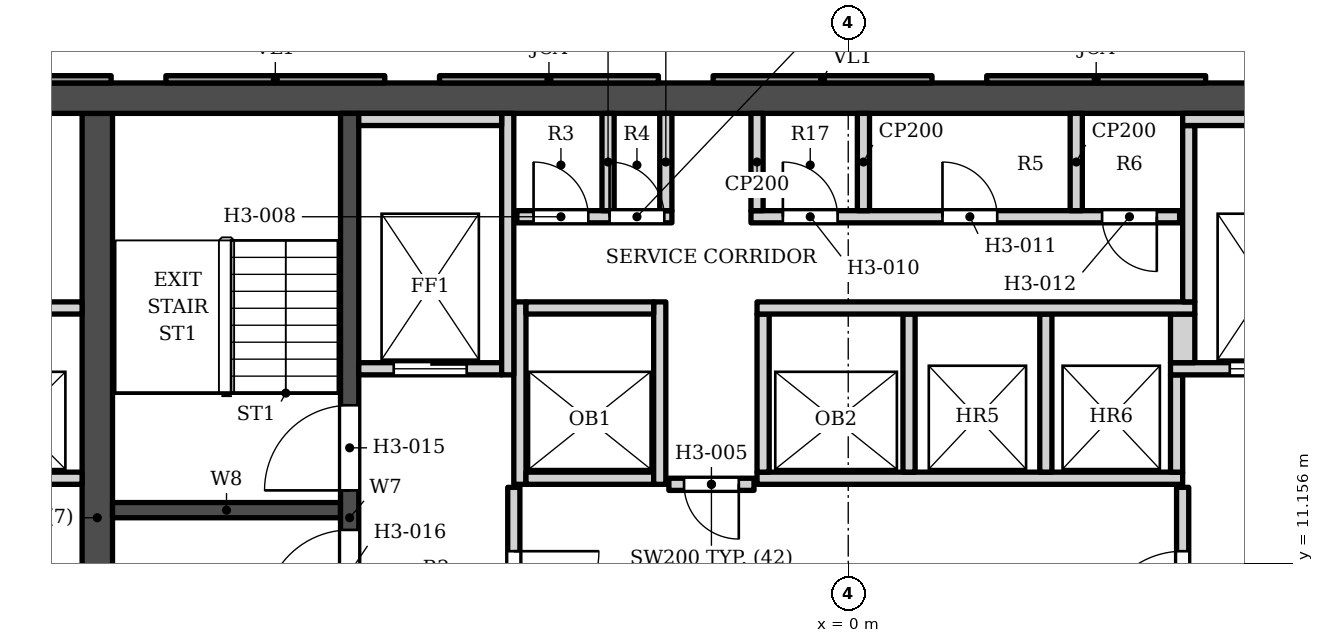
"""IFC4 building model, lengths in metres.
Left out: names, types, materials, properties, quantities, classifications, styles, units other than length and angle.
Written with IfcOpenShell. Run it as: python <this file> out.ifc"""

import sys

from ifc_helpers import new_model, si_unit, direction, frame, frame_2d, origin, place, context, subcontext, project, spatial, polyline, rectangle, outline, extrude, element, fill, save


model = new_model("IFC4")
c1 = context("Model", 3, precision=1e-05, world=origin(), true_north=direction((0.0, 1.0)))
c2 = subcontext(c1, "Body", "Model", "MODEL_VIEW")
j1 = project(units=[si_unit("LENGTHUNIT", "METRE"), si_unit("PLANEANGLEUNIT", "RADIAN")], contexts=[c1])
p1 = place(None, origin())
s1 = spatial("IfcSite", under=j1, at=p1, CompositionType="ELEMENT")
p2 = place(p1, origin())
s2 = spatial("IfcBuilding", under=s1, at=p2, CompositionType="ELEMENT")
p3 = place(p2, frame((0.0, 0.0, 66.4)))
s3 = spatial("IfcBuildingStorey", under=s2, at=p3, CompositionType="ELEMENT", Elevation=66.4)
p4 = place(p3, frame((-16.9, 18.802, 0.0), z_axis=(0.0, 0.0, 1.0), x_axis=(1.0, 0.0, 0.0)))
e1 = element("IfcWall", 1, at=p4, inside=s3, PredefinedType="SHEAR", context=c2, shape_type="SweptSolid", body=[
    extrude(rectangle(XDim=33.8, YDim=0.5, at=frame_2d((16.9, 0.0))), origin(), (0.0, 0.0, 1.0), 3.4),
])
p5 = place(p3, frame((-12.35, 5.253, 0.0), z_axis=(0.0, 0.0, 1.0), x_axis=(0.0, 1.0, 0.0)))
e2 = element("IfcWall", 2, at=p5, inside=s3, PredefinedType="SHEAR", context=c2, shape_type="SweptSolid", body=[
    extrude(rectangle(XDim=13.3, YDim=0.5, at=frame_2d((6.65, 0.0))), origin(), (0.0, 0.0, 1.0), 3.4),
])
p6 = place(p3, frame((-8.2, 5.253, 0.0), z_axis=(0.0, 0.0, 1.0), x_axis=(0.0, 1.0, 0.0)))
e3 = element("IfcWall", 3, at=p6, inside=s3, PredefinedType="SHEAR", context=c2, shape_type="SweptSolid", body=[
    extrude(rectangle(XDim=13.3, YDim=0.3, at=frame_2d((6.65, 0.0))), origin(), (0.0, 0.0, 1.0), 3.4),
])
p7 = place(p6, frame((7.1, 0.0, 0.0)))
e4 = element("IfcOpeningElement", 4, at=p7, cuts=e3, PredefinedType="OPENING", context=c2, shape_type="SweptSolid", body=[
    extrude(rectangle(XDim=1.4, YDim=2.1, at=frame_2d((0.7, 1.05))), frame((0.0, 0.16, 0.0), z_axis=(0.0, -1.0, 0.0), x_axis=(1.0, 0.0, 0.0)), (0.0, 0.0, 1.0), 0.32),
])
p8 = place(p6, frame((5.05, 0.0, 0.0)))
e5 = element("IfcOpeningElement", 5, at=p8, cuts=e3, PredefinedType="OPENING", context=c2, shape_type="SweptSolid", body=[
    extrude(rectangle(XDim=1.4, YDim=2.1, at=frame_2d((0.7, 1.05))), frame((0.0, 0.16, 0.0), z_axis=(0.0, -1.0, 0.0), x_axis=(1.0, 0.0, 0.0)), (0.0, 0.0, 1.0), 0.32),
])
p9 = place(p3, frame((-12.1, 12.028, 0.0), z_axis=(0.0, 0.0, 1.0), x_axis=(1.0, 0.0, 0.0)))
e6 = element("IfcWall", 6, at=p9, inside=s3, PredefinedType="SHEAR", context=c2, shape_type="SweptSolid", body=[
    extrude(rectangle(XDim=3.75, YDim=0.25, at=frame_2d((1.875, 0.0))), origin(), (0.0, 0.0, 1.0), 3.4),
])
p10 = place(p3, origin())
e7 = element("IfcWall", 7, at=p10, inside=s3, PredefinedType="SOLIDWALL", context=c2, shape_type="SweptSolid", body=[
    extrude(outline(polyline([(2.278, 19.173), (2.278, 19.052), (5.878, 19.052), (5.878, 19.173), (2.278, 19.173)])), origin(), (0.0, 0.0, 1.0), 2.65),
])
p11 = place(p3, origin())
e8 = element("IfcWall", 8, at=p11, inside=s3, PredefinedType="ELEMENTEDWALL", context=c2, shape_type="SweptSolid", body=[
    extrude(outline(polyline([(-2.222, 19.173), (-2.222, 19.052), (1.378, 19.052), (1.378, 19.173), (-2.222, 19.173)])), origin(), (0.0, 0.0, 1.0), 2.65),
])
p12 = place(p3, origin())
e9 = element("IfcWall", 9, at=p12, inside=s3, PredefinedType="SOLIDWALL", context=c2, shape_type="SweptSolid", body=[
    extrude(outline(polyline([(-6.722, 19.173), (-6.722, 19.052), (-3.122, 19.052), (-3.122, 19.173), (-6.722, 19.173)])), origin(), (0.0, 0.0, 1.0), 2.65),
])
p13 = place(p3, origin())
e10 = element("IfcWall", 10, at=p13, inside=s3, PredefinedType="ELEMENTEDWALL", context=c2, shape_type="SweptSolid", body=[
    extrude(outline(polyline([(-11.222, 19.173), (-11.222, 19.052), (-7.622, 19.052), (-7.622, 19.173), (-11.222, 19.173)])), origin(), (0.0, 0.0, 1.0), 2.65),
])
p14 = place(p3, origin())
e11 = element("IfcWall", 11, at=p14, inside=s3, PredefinedType="SOLIDWALL", context=c2, shape_type="SweptSolid", body=[
    extrude(outline(polyline([(-15.722, 19.173), (-15.722, 19.052), (-12.122, 19.052), (-12.122, 19.173), (-15.722, 19.173)])), origin(), (0.0, 0.0, 1.0), 2.65),
])
p15 = place(p3, frame((-5.5, 9.103, 0.0), z_axis=(0.0, 0.0, 1.0), x_axis=(0.0, 1.0, 0.0)))
e12 = element("IfcWall", 12, at=p15, inside=s3, PredefinedType="SOLIDWALL", context=c2, shape_type="SweptSolid", body=[
    extrude(rectangle(XDim=3.3, YDim=0.2, at=frame_2d((1.65, 0.0))), origin(), (0.0, 0.0, 1.0), 3.23),
])
p16 = place(p15, frame((0.85, 0.0, 0.0)))
e13 = element("IfcOpeningElement", 13, at=p16, cuts=e12, PredefinedType="OPENING", context=c2, shape_type="SweptSolid", body=[
    extrude(rectangle(XDim=1.4, YDim=2.1, at=frame_2d((0.7, 1.05))), frame((0.0, 0.11, 0.0), z_axis=(0.0, -1.0, 0.0), x_axis=(1.0, 0.0, 0.0)), (0.0, 0.0, 1.0), 0.22),
])
p17 = place(p3, frame((5.5, 9.103, 0.0), z_axis=(0.0, 0.0, 1.0), x_axis=(0.0, 1.0, 0.0)))
e14 = element("IfcWall", 14, at=p17, inside=s3, PredefinedType="SOLIDWALL", context=c2, shape_type="SweptSolid", body=[
    extrude(rectangle(XDim=3.3, YDim=0.2, at=frame_2d((1.65, 0.0))), origin(), (0.0, 0.0, 1.0), 3.23),
])
p18 = place(p17, frame((0.85, 0.0, 0.0)))
e15 = element("IfcOpeningElement", 15, at=p18, cuts=e14, PredefinedType="OPENING", context=c2, shape_type="SweptSolid", body=[
    extrude(rectangle(XDim=1.4, YDim=2.1, at=frame_2d((0.7, 1.05))), frame((0.0, 0.11, 0.0), z_axis=(0.0, -1.0, 0.0), x_axis=(1.0, 0.0, 0.0)), (0.0, 0.0, 1.0), 0.22),
])
p19 = place(p3, frame((-2.95, 12.453, 0.0), z_axis=(0.0, 0.0, 1.0), x_axis=(1.0, 0.0, 0.0)))
e16 = element("IfcWall", 16, at=p19, inside=s3, PredefinedType="SOLIDWALL", context=c2, shape_type="SweptSolid", body=[
    extrude(rectangle(XDim=1.4, YDim=0.2, at=frame_2d((0.7, 0.0))), origin(), (0.0, 0.0, 1.0), 3.23),
])
p20 = place(p19, frame((0.25, 0.0, 0.0)))
e17 = element("IfcOpeningElement", 17, at=p20, cuts=e16, PredefinedType="OPENING", context=c2, shape_type="SweptSolid", body=[
    extrude(rectangle(XDim=0.9, YDim=2.1, at=frame_2d((0.45, 1.05))), frame((0.0, 0.11, 0.0), z_axis=(0.0, -1.0, 0.0), x_axis=(1.0, 0.0, 0.0)), (0.0, 0.0, 1.0), 0.22),
])
p21 = place(p3, frame((-16.9, 12.552, 0.0), z_axis=(0.0, 0.0, 1.0), x_axis=(1.0, 0.0, 0.0)))
e18 = element("IfcWall", 18, at=p21, inside=s3, PredefinedType="SOLIDWALL", context=c2, shape_type="SweptSolid", body=[
    extrude(rectangle(XDim=4.3, YDim=0.2, at=frame_2d((2.15, 0.0))), origin(), (0.0, 0.0, 1.0), 3.23),
])
p22 = place(p21, frame((2.675, 0.0, 0.0)))
e19 = element("IfcOpeningElement", 19, at=p22, cuts=e18, PredefinedType="OPENING", context=c2, shape_type="SweptSolid", body=[
    extrude(rectangle(XDim=1.1, YDim=2.1, at=frame_2d((0.55, 1.05))), frame((0.0, 0.11, 0.0), z_axis=(0.0, -1.0, 0.0), x_axis=(1.0, 0.0, 0.0)), (0.0, 0.0, 1.0), 0.22),
])
p23 = place(p21, frame((0.425, 0.0, 0.0)))
e20 = element("IfcOpeningElement", 20, at=p23, cuts=e18, PredefinedType="OPENING", context=c2, shape_type="SweptSolid", body=[
    extrude(rectangle(XDim=1.1, YDim=2.1, at=frame_2d((0.55, 1.05))), frame((0.0, 0.11, 0.0), z_axis=(0.0, -1.0, 0.0), x_axis=(1.0, 0.0, 0.0)), (0.0, 0.0, 1.0), 0.22),
])
p24 = place(p3, frame((-5.4, 12.453, 0.0), z_axis=(0.0, 0.0, 1.0), x_axis=(0.0, 1.0, 0.0)))
e21 = element("IfcWall", 21, at=p24, inside=s3, PredefinedType="SOLIDWALL", context=c2, shape_type="SweptSolid", body=[
    extrude(rectangle(XDim=3.0, YDim=0.2, at=frame_2d((1.5, 0.0))), origin(), (0.0, 0.0, 1.0), 3.23),
])
p25 = place(p3, frame((-5.3, 12.552, 0.0), z_axis=(0.0, 0.0, 1.0), x_axis=(1.0, 0.0, 0.0)))
e22 = element("IfcWall", 22, at=p25, inside=s3, PredefinedType="SOLIDWALL", context=c2, shape_type="SweptSolid", body=[
    extrude(rectangle(XDim=2.1, YDim=0.2, at=frame_2d((1.05, 0.0))), origin(), (0.0, 0.0, 1.0), 3.23),
])
p26 = place(p3, frame((-3.1, 12.453, 0.0), z_axis=(0.0, 0.0, 1.0), x_axis=(0.0, 1.0, 0.0)))
e23 = element("IfcWall", 23, at=p26, inside=s3, PredefinedType="SOLIDWALL", context=c2, shape_type="SweptSolid", body=[
    extrude(rectangle(XDim=3.0, YDim=0.2, at=frame_2d((1.5, 0.0))), origin(), (0.0, 0.0, 1.0), 3.23),
])
p27 = place(p3, frame((-1.5, 12.552, 0.0), z_axis=(0.0, 0.0, 1.0), x_axis=(1.0, 0.0, 0.0)))
e24 = element("IfcWall", 24, at=p27, inside=s3, PredefinedType="SOLIDWALL", context=c2, shape_type="SweptSolid", body=[
    extrude(rectangle(XDim=7.0, YDim=0.2, at=frame_2d((3.5, 0.0))), origin(), (0.0, 0.0, 1.0), 3.23),
])
for number, where, z_axis, x_axis in (
    (25, (-1.4, 12.653, 0.0), (0.0, 0.0, 1.0), (0.0, 1.0, 0.0)),
    (26, (1.0, 12.653, 0.0), (0.0, 0.0, 1.0), (0.0, 1.0, 0.0)),
    (27, (3.25, 12.653, 0.0), (0.0, 0.0, 1.0), (0.0, 1.0, 0.0)),
):
    element("IfcWall", number, at=place(p3, frame(where, z_axis=z_axis, x_axis=x_axis)), inside=s3, PredefinedType="SOLIDWALL", context=c2, shape_type="SweptSolid", body=[
        extrude(rectangle(XDim=2.6, YDim=0.2, at=frame_2d((1.3, 0.0))), origin(), (0.0, 0.0, 1.0), 3.23),
    ])
p28 = place(p3, frame((5.4, 12.653, 0.0), z_axis=(0.0, 0.0, 1.0), x_axis=(0.0, 1.0, 0.0)))
e28 = element("IfcWall", 28, at=p28, inside=s3, PredefinedType="SOLIDWALL", context=c2, shape_type="SweptSolid", body=[
    extrude(rectangle(XDim=1.6, YDim=0.2, at=frame_2d((0.8, 0.0))), origin(), (0.0, 0.0, 1.0), 3.23),
])
p29 = place(p3, frame((-8.05, 14.353, 0.0), z_axis=(0.0, 0.0, 1.0), x_axis=(1.0, 0.0, 0.0)))
e29 = element("IfcWall", 29, at=p29, inside=s3, PredefinedType="SOLIDWALL", context=c2, shape_type="SweptSolid", body=[
    extrude(rectangle(XDim=2.35, YDim=0.2, at=frame_2d((1.175, 0.0))), origin(), (0.0, 0.0, 1.0), 3.23),
])
p30 = place(p29, frame((0.575, 0.0, 0.0)))
e30 = element("IfcOpeningElement", 30, at=p30, cuts=e29, PredefinedType="OPENING", context=c2, shape_type="SweptSolid", body=[
    extrude(rectangle(XDim=1.2, YDim=2.1, at=frame_2d((0.6, 1.05))), frame((0.0, 0.11, 0.0), z_axis=(0.0, -1.0, 0.0), x_axis=(1.0, 0.0, 0.0)), (0.0, 0.0, 1.0), 0.22),
])
p31 = place(p3, frame((-5.6, 14.253, 0.0), z_axis=(0.0, 0.0, 1.0), x_axis=(0.0, 1.0, 0.0)))
e31 = element("IfcWall", 31, at=p31, inside=s3, PredefinedType="SOLIDWALL", context=c2, shape_type="SweptSolid", body=[
    extrude(rectangle(XDim=4.3, YDim=0.2, at=frame_2d((2.15, 0.0))), origin(), (0.0, 0.0, 1.0), 3.23),
])
p32 = place(p3, frame((5.3, 14.353, 0.0), z_axis=(0.0, 0.0, 1.0), x_axis=(1.0, 0.0, 0.0)))
e32 = element("IfcWall", 32, at=p32, inside=s3, PredefinedType="SOLIDWALL", context=c2, shape_type="SweptSolid", body=[
    extrude(rectangle(XDim=2.75, YDim=0.2, at=frame_2d((1.375, 0.0))), origin(), (0.0, 0.0, 1.0), 3.23),
])
p33 = place(p32, frame((0.975, 0.0, 0.0)))
e33 = element("IfcOpeningElement", 33, at=p33, cuts=e32, PredefinedType="OPENING", context=c2, shape_type="SweptSolid", body=[
    extrude(rectangle(XDim=1.2, YDim=2.1, at=frame_2d((0.6, 1.05))), frame((0.0, 0.11, 0.0), z_axis=(0.0, -1.0, 0.0), x_axis=(1.0, 0.0, 0.0)), (0.0, 0.0, 1.0), 0.22),
])
p34 = place(p3, frame((5.5, 14.453, 0.0), z_axis=(0.0, 0.0, 1.0), x_axis=(0.0, 1.0, 0.0)))
e34 = element("IfcWall", 34, at=p34, inside=s3, PredefinedType="SOLIDWALL", context=c2, shape_type="SweptSolid", body=[
    extrude(rectangle(XDim=0.8, YDim=0.4, at=frame_2d((0.4, 0.0))), origin(), (0.0, 0.0, 1.0), 3.23),
])
p35 = place(p3, frame((-16.9, 15.353, 0.0), z_axis=(0.0, 0.0, 1.0), x_axis=(1.0, 0.0, 0.0)))
e35 = element("IfcWall", 35, at=p35, inside=s3, PredefinedType="SOLIDWALL", context=c2, shape_type="SweptSolid", body=[
    extrude(rectangle(XDim=4.3, YDim=0.2, at=frame_2d((2.15, 0.0))), origin(), (0.0, 0.0, 1.0), 3.23),
])
p36 = place(p3, frame((-5.3, 15.353, 0.0), z_axis=(0.0, 0.0, 1.0), x_axis=(1.0, 0.0, 0.0)))
e36 = element("IfcWall", 36, at=p36, inside=s3, PredefinedType="SOLIDWALL", context=c2, shape_type="SweptSolid", body=[
    extrude(rectangle(XDim=2.1, YDim=0.2, at=frame_2d((1.05, 0.0))), origin(), (0.0, 0.0, 1.0), 3.23),
])
p37 = place(p3, frame((-1.5, 15.353, 0.0), z_axis=(0.0, 0.0, 1.0), x_axis=(1.0, 0.0, 0.0)))
e37 = element("IfcWall", 37, at=p37, inside=s3, PredefinedType="SOLIDWALL", context=c2, shape_type="SweptSolid", body=[
    extrude(rectangle(XDim=7.2, YDim=0.2, at=frame_2d((3.6, 0.0))), origin(), (0.0, 0.0, 1.0), 3.23),
])
p38 = place(p3, frame((5.6, 15.453, 0.0), z_axis=(0.0, 0.0, 1.0), x_axis=(0.0, 1.0, 0.0)))
e38 = element("IfcWall", 38, at=p38, inside=s3, PredefinedType="SOLIDWALL", context=c2, shape_type="SweptSolid", body=[
    extrude(rectangle(XDim=2.9, YDim=0.2, at=frame_2d((1.45, 0.0))), origin(), (0.0, 0.0, 1.0), 3.23),
])
p39 = place(p3, frame((-5.45, 16.853, 0.0), z_axis=(0.0, 0.0, 1.0), x_axis=(1.0, 0.0, 0.0)))
e39 = element("IfcWall", 39, at=p39, inside=s3, PredefinedType="SOLIDWALL", context=c2, shape_type="SweptSolid", body=[
    extrude(rectangle(XDim=2.55, YDim=0.2, at=frame_2d((1.275, 0.0))), origin(), (0.0, 0.0, 1.0), 3.23),
])
p40 = place(p39, frame((0.275, 0.0, 0.0)))
e40 = element("IfcOpeningElement", 40, at=p40, cuts=e39, PredefinedType="OPENING", context=c2, shape_type="SweptSolid", body=[
    extrude(rectangle(XDim=0.9, YDim=2.1, at=frame_2d((0.45, 1.05))), frame((0.0, 0.11, 0.0), z_axis=(0.0, -1.0, 0.0), x_axis=(1.0, 0.0, 0.0)), (0.0, 0.0, 1.0), 0.22),
])
p41 = place(p39, frame((1.525, 0.0, 0.0)))
e41 = element("IfcOpeningElement", 41, at=p41, cuts=e39, PredefinedType="OPENING", context=c2, shape_type="SweptSolid", body=[
    extrude(rectangle(XDim=0.9, YDim=2.1, at=frame_2d((0.45, 1.05))), frame((0.0, 0.11, 0.0), z_axis=(0.0, -1.0, 0.0), x_axis=(1.0, 0.0, 0.0)), (0.0, 0.0, 1.0), 0.22),
])
p42 = place(p3, frame((-1.6, 16.853, 0.0), z_axis=(0.0, 0.0, 1.0), x_axis=(1.0, 0.0, 0.0)))
e42 = element("IfcWall", 42, at=p42, inside=s3, PredefinedType="SOLIDWALL", context=c2, shape_type="SweptSolid", body=[
    extrude(rectangle(XDim=7.05, YDim=0.2, at=frame_2d((3.525, 0.0))), origin(), (0.0, 0.0, 1.0), 3.23),
])
p43 = place(p42, frame((0.525, 0.0, 0.0)))
e43 = element("IfcOpeningElement", 43, at=p43, cuts=e42, PredefinedType="OPENING", context=c2, shape_type="SweptSolid", body=[
    extrude(rectangle(XDim=0.9, YDim=2.1, at=frame_2d((0.45, 1.05))), frame((0.0, 0.11, 0.0), z_axis=(0.0, -1.0, 0.0), x_axis=(1.0, 0.0, 0.0)), (0.0, 0.0, 1.0), 0.22),
])
p44 = place(p42, frame((3.15, 0.0, 0.0)))
e44 = element("IfcOpeningElement", 44, at=p44, cuts=e42, PredefinedType="OPENING", context=c2, shape_type="SweptSolid", body=[
    extrude(rectangle(XDim=0.9, YDim=2.1, at=frame_2d((0.45, 1.05))), frame((0.0, 0.11, 0.0), z_axis=(0.0, -1.0, 0.0), x_axis=(1.0, 0.0, 0.0)), (0.0, 0.0, 1.0), 0.22),
])
p45 = place(p42, frame((5.775, 0.0, 0.0)))
e45 = element("IfcOpeningElement", 45, at=p45, cuts=e42, PredefinedType="OPENING", context=c2, shape_type="SweptSolid", body=[
    extrude(rectangle(XDim=0.9, YDim=2.1, at=frame_2d((0.45, 1.05))), frame((0.0, 0.11, 0.0), z_axis=(0.0, -1.0, 0.0), x_axis=(1.0, 0.0, 0.0)), (0.0, 0.0, 1.0), 0.22),
])
for number, where, z_axis, x_axis in (
    (46, (-3.95, 16.953, 0.0), (0.0, 0.0, 1.0), (0.0, 1.0, 0.0)),
    (47, (-3.0, 16.953, 0.0), (0.0, 0.0, 1.0), (0.0, 1.0, 0.0)),
    (48, (-1.5, 16.953, 0.0), (0.0, 0.0, 1.0), (0.0, 1.0, 0.0)),
    (49, (0.25, 16.953, 0.0), (0.0, 0.0, 1.0), (0.0, 1.0, 0.0)),
    (50, (3.75, 16.953, 0.0), (0.0, 0.0, 1.0), (0.0, 1.0, 0.0)),
):
    element("IfcWall", number, at=place(p3, frame(where, z_axis=z_axis, x_axis=x_axis)), inside=s3, PredefinedType="PARTITIONING", context=c2, shape_type="SweptSolid", body=[
        extrude(rectangle(XDim=1.6, YDim=0.2, at=frame_2d((0.8, 0.0))), origin(), (0.0, 0.0, 1.0), 3.23),
    ])
p46 = place(p3, frame((-8.05, 18.453, 0.0), z_axis=(0.0, 0.0, 1.0), x_axis=(1.0, 0.0, 0.0)))
e51 = element("IfcWall", 51, at=p46, inside=s3, PredefinedType="SOLIDWALL", context=c2, shape_type="SweptSolid", body=[
    extrude(rectangle(XDim=2.35, YDim=0.2, at=frame_2d((1.175, 0.0))), origin(), (0.0, 0.0, 1.0), 3.23),
])
p47 = place(p3, frame((5.5, 18.453, 0.0), z_axis=(0.0, 0.0, 1.0), x_axis=(1.0, 0.0, 0.0)))
e52 = element("IfcWall", 52, at=p47, inside=s3, PredefinedType="SOLIDWALL", context=c2, shape_type="SweptSolid", body=[
    extrude(rectangle(XDim=2.55, YDim=0.2, at=frame_2d((1.275, 0.0))), origin(), (0.0, 0.0, 1.0), 3.23),
])
p48 = place(p30, origin())
e53 = element("IfcDoor", 53, at=p48, inside=s3, OperationType="DOUBLE_DOOR_SLIDING", PredefinedType="DOOR", context=c2, shape_type="SweptSolid", body=[
    extrude(rectangle(XDim=1.2, YDim=2.1, at=frame_2d((0.6, 1.05))), frame((0.0, 0.025, 0.0), z_axis=(0.0, -1.0, 0.0), x_axis=(1.0, 0.0, 0.0)), (0.0, 0.0, 1.0), 0.05),
])
fill(e30, e53)
p49 = place(p33, origin())
e54 = element("IfcDoor", 54, at=p49, inside=s3, OperationType="DOUBLE_DOOR_SLIDING", PredefinedType="DOOR", context=c2, shape_type="SweptSolid", body=[
    extrude(rectangle(XDim=1.2, YDim=2.1, at=frame_2d((0.6, 1.05))), frame((0.0, 0.025, 0.0), z_axis=(0.0, -1.0, 0.0), x_axis=(1.0, 0.0, 0.0)), (0.0, 0.0, 1.0), 0.05),
])
fill(e33, e54)
p50 = place(p7, origin())
e55 = element("IfcDoor", 55, at=p50, inside=s3, OperationType="SINGLE_SWING_LEFT", PredefinedType="DOOR", context=c2, shape_type="SweptSolid", body=[
    extrude(rectangle(XDim=1.4, YDim=2.1, at=frame_2d((0.7, 1.05))), frame((0.0, 0.025, 0.0), z_axis=(0.0, -1.0, 0.0), x_axis=(1.0, 0.0, 0.0)), (0.0, 0.0, 1.0), 0.05),
])
fill(e4, e55)
p51 = place(p8, origin())
e56 = element("IfcDoor", 56, at=p51, inside=s3, OperationType="SINGLE_SWING_LEFT", PredefinedType="DOOR", context=c2, shape_type="SweptSolid", body=[
    extrude(rectangle(XDim=1.4, YDim=2.1, at=frame_2d((0.7, 1.05))), frame((0.0, 0.025, 0.0), z_axis=(0.0, -1.0, 0.0), x_axis=(1.0, 0.0, 0.0)), (0.0, 0.0, 1.0), 0.05),
])
fill(e5, e56)
p52 = place(p20, origin())
e57 = element("IfcDoor", 57, at=p52, inside=s3, OperationType="SINGLE_SWING_RIGHT", PredefinedType="DOOR", context=c2, shape_type="SweptSolid", body=[
    extrude(rectangle(XDim=0.9, YDim=2.1, at=frame_2d((0.45, 1.05))), frame((0.0, 0.025, 0.0), z_axis=(0.0, -1.0, 0.0), x_axis=(1.0, 0.0, 0.0)), (0.0, 0.0, 1.0), 0.05),
])
fill(e17, e57)
p53 = place(p16, origin())
e58 = element("IfcDoor", 58, at=p53, inside=s3, OperationType="SINGLE_SWING_RIGHT", PredefinedType="DOOR", context=c2, shape_type="SweptSolid", body=[
    extrude(rectangle(XDim=1.4, YDim=2.1, at=frame_2d((0.7, 1.05))), frame((0.0, 0.025, 0.0), z_axis=(0.0, -1.0, 0.0), x_axis=(1.0, 0.0, 0.0)), (0.0, 0.0, 1.0), 0.05),
])
fill(e13, e58)
p54 = place(p18, origin())
e59 = element("IfcDoor", 59, at=p54, inside=s3, OperationType="SINGLE_SWING_LEFT", PredefinedType="DOOR", context=c2, shape_type="SweptSolid", body=[
    extrude(rectangle(XDim=1.4, YDim=2.1, at=frame_2d((0.7, 1.05))), frame((0.0, 0.025, 0.0), z_axis=(0.0, -1.0, 0.0), x_axis=(1.0, 0.0, 0.0)), (0.0, 0.0, 1.0), 0.05),
])
fill(e15, e59)
p55 = place(p40, origin())
e60 = element("IfcDoor", 60, at=p55, inside=s3, OperationType="SINGLE_SWING_LEFT", PredefinedType="DOOR", context=c2, shape_type="SweptSolid", body=[
    extrude(rectangle(XDim=0.9, YDim=2.1, at=frame_2d((0.45, 1.05))), frame((0.0, 0.025, 0.0), z_axis=(0.0, -1.0, 0.0), x_axis=(1.0, 0.0, 0.0)), (0.0, 0.0, 1.0), 0.05),
])
fill(e40, e60)
p56 = place(p41, origin())
e61 = element("IfcDoor", 61, at=p56, inside=s3, OperationType="SINGLE_SWING_LEFT", PredefinedType="DOOR", context=c2, shape_type="SweptSolid", body=[
    extrude(rectangle(XDim=0.9, YDim=2.1, at=frame_2d((0.45, 1.05))), frame((0.0, 0.025, 0.0), z_axis=(0.0, -1.0, 0.0), x_axis=(1.0, 0.0, 0.0)), (0.0, 0.0, 1.0), 0.05),
])
fill(e41, e61)
p57 = place(p43, origin())
e62 = element("IfcDoor", 62, at=p57, inside=s3, OperationType="SINGLE_SWING_LEFT", PredefinedType="DOOR", context=c2, shape_type="SweptSolid", body=[
    extrude(rectangle(XDim=0.9, YDim=2.1, at=frame_2d((0.45, 1.05))), frame((0.0, 0.025, 0.0), z_axis=(0.0, -1.0, 0.0), x_axis=(1.0, 0.0, 0.0)), (0.0, 0.0, 1.0), 0.05),
])
fill(e43, e62)
p58 = place(p44, origin())
e63 = element("IfcDoor", 63, at=p58, inside=s3, OperationType="SINGLE_SWING_LEFT", PredefinedType="DOOR", context=c2, shape_type="SweptSolid", body=[
    extrude(rectangle(XDim=0.9, YDim=2.1, at=frame_2d((0.45, 1.05))), frame((0.0, 0.025, 0.0), z_axis=(0.0, -1.0, 0.0), x_axis=(1.0, 0.0, 0.0)), (0.0, 0.0, 1.0), 0.05),
])
fill(e44, e63)
p59 = place(p45, origin())
e64 = element("IfcDoor", 64, at=p59, inside=s3, OperationType="SINGLE_SWING_RIGHT", PredefinedType="DOOR", context=c2, shape_type="SweptSolid", body=[
    extrude(rectangle(XDim=0.9, YDim=2.1, at=frame_2d((0.45, 1.05))), frame((0.0, 0.025, 0.0), z_axis=(0.0, -1.0, 0.0), x_axis=(1.0, 0.0, 0.0)), (0.0, 0.0, 1.0), 0.05),
])
fill(e45, e64)
save(model, sys.argv[1])
